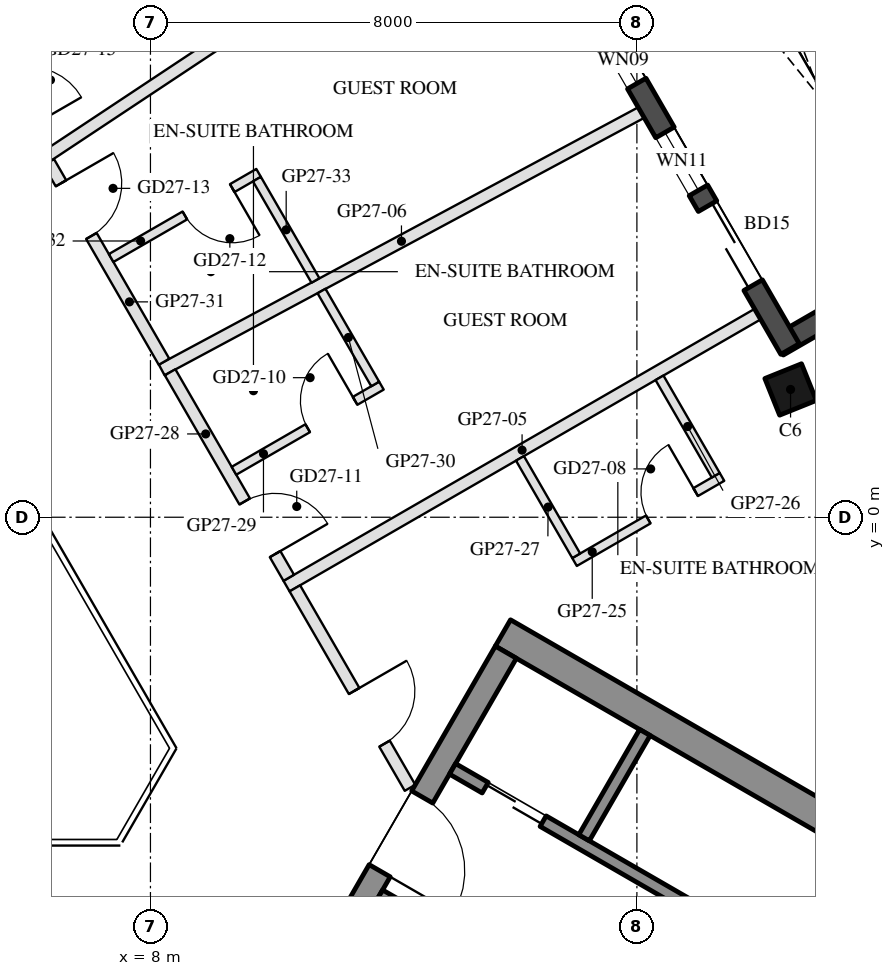
"""IFC4 building model, lengths in metres.
Left out: names, types, materials, properties, quantities, classifications, styles, units other than length and angle.
Written with IfcOpenShell. Run it as: python <this file> out.ifc"""

import sys

from ifc_helpers import new_model, si_unit, direction, frame, frame_2d, origin, origin_2d, place, context, subcontext, project, spatial, rectangle, hollow_rectangle, extrude, boolean, halfspace, element, fill, save


model = new_model("IFC4")
c1 = context("Model", 3, precision=1e-05, world=origin(), true_north=direction((0.0, 1.0)))
c2 = subcontext(c1, "Body", "Model", "MODEL_VIEW")
j1 = project(units=[si_unit("LENGTHUNIT", "METRE"), si_unit("PLANEANGLEUNIT", "RADIAN")], contexts=[c1])
p1 = place(None, origin())
s1 = spatial("IfcSite", under=j1, at=p1, CompositionType="ELEMENT")
p2 = place(p1, origin())
s2 = spatial("IfcBuilding", under=s1, at=p2, CompositionType="ELEMENT")
p3 = place(p2, frame((0.0, 0.0, 276.3)))
s3 = spatial("IfcBuildingStorey", under=s2, at=p3, CompositionType="ELEMENT", Elevation=276.3)
p4 = place(p3, frame((18.527, 2.102, 0.0), z_axis=(-0.16132511193, -0.02291623866, 0.98663521844), x_axis=(0.495162384909, -0.866667980787, 0.060834395287)))
e1 = element("IfcColumn", 1, at=p4, inside=s3, PredefinedType="COLUMN", context=c2, shape_type="SweptSolid", body=[
    boolean("DIFFERENCE", boolean("DIFFERENCE", extrude(hollow_rectangle(XDim=0.65, YDim=0.65, WallThickness=0.03, at=origin_2d()), origin(), (0.0, 0.0, 1.0), 3.75), halfspace(frame((0.0, 0.0, 0.04), z_axis=(0.0, 0.0, 1.0), x_axis=(1.0, 0.0, 0.0)), True)), halfspace(frame((0.0, 0.0, 3.71), z_axis=(0.0, 0.0, 1.0), x_axis=(1.0, 0.0, 0.0)), False)),
])
p5 = place(p3, frame((19.377, 3.429, 0.0), z_axis=(0.0, 0.0, 1.0), x_axis=(-0.866092288191, -0.499884134912, 0.0)))
e2 = element("IfcWall", 2, at=p5, inside=s3, PredefinedType="SOLIDWALL", context=c2, shape_type="SweptSolid", body=[
    extrude(rectangle(XDim=1.22, YDim=0.35, at=frame_2d((0.61, 0.0))), origin(), (0.0, 0.0, 1.0), 3.55),
])
p6 = place(p3, frame((18.519, 2.766, 0.0), z_axis=(0.0, 0.0, 1.0), x_axis=(-0.499995993298, 0.866027717042, 0.0)))
e3 = element("IfcWall", 3, at=p6, inside=s3, PredefinedType="SOLIDWALL", context=c2, shape_type="SweptSolid", body=[
    extrude(rectangle(XDim=6.284, YDim=0.35, at=frame_2d((3.142, 0.0))), origin(), (0.0, 0.0, 1.0), 3.55),
])
p7 = place(p6, frame((1.213, 0.0, 0.0)))
e4 = element("IfcOpeningElement", 4, at=p7, cuts=e3, PredefinedType="OPENING", context=c2, shape_type="SweptSolid", body=[
    extrude(rectangle(XDim=1.5, YDim=2.4, at=frame_2d((0.75, 1.2))), frame((0.0, 0.185, 0.0), z_axis=(0.0, -1.0, 0.0), x_axis=(1.0, 0.0, 0.0)), (0.0, 0.0, 1.0), 0.37),
])
p8 = place(p6, frame((3.013, 0.0, 0.3)))
e5 = element("IfcOpeningElement", 5, at=p8, cuts=e3, PredefinedType="OPENING", context=c2, shape_type="SweptSolid", body=[
    extrude(rectangle(XDim=1.1, YDim=2.65, at=frame_2d((0.55, 1.325))), frame((0.0, 0.185, 0.0), z_axis=(0.0, -1.0, 0.0), x_axis=(1.0, 0.0, 0.0)), (0.0, 0.0, 1.0), 0.37),
])
p9 = place(p6, frame((5.042, 0.0, 0.3)))
e6 = element("IfcOpeningElement", 6, at=p9, cuts=e3, PredefinedType="OPENING", context=c2, shape_type="SweptSolid", body=[
    extrude(rectangle(XDim=0.9, YDim=2.65, at=frame_2d((0.45, 1.325))), frame((0.0, 0.185, 0.0), z_axis=(0.0, -1.0, 0.0), x_axis=(1.0, 0.0, 0.0)), (0.0, 0.0, 1.0), 0.37),
])
p10 = place(p3, frame((13.797, -1.903, 0.0), z_axis=(0.0, 0.0, 1.0), x_axis=(0.866022106474, -0.500005711065, 0.0)))
e7 = element("IfcWall", 7, at=p10, inside=s3, PredefinedType="SHEAR", context=c2, shape_type="SweptSolid", body=[
    extrude(rectangle(XDim=13.031, YDim=0.5, at=frame_2d((6.516, 0.0))), origin(), (0.0, 0.0, 1.0), 3.5),
])
p11 = place(p3, frame((8.845, -10.88, 0.0), z_axis=(0.0, 0.0, 1.0), x_axis=(0.500004234368, 0.866022959057, 0.0)))
e8 = element("IfcWall", 8, at=p11, inside=s3, PredefinedType="SHEAR", context=c2, shape_type="SweptSolid", body=[
    extrude(rectangle(XDim=10.0, YDim=0.4, at=frame_2d((5.0, 0.0))), origin(), (0.0, 0.0, 1.0), 3.5),
])
p12 = place(p11, frame((3.55, 0.0, 0.0)))
e9 = element("IfcOpeningElement", 9, at=p12, cuts=e8, PredefinedType="OPENING", context=c2, shape_type="SweptSolid", body=[
    extrude(rectangle(XDim=1.1, YDim=2.1, at=frame_2d((0.55, 1.05))), frame((0.0, 0.21, 0.0), z_axis=(0.0, -1.0, 0.0), x_axis=(1.0, 0.0, 0.0)), (0.0, 0.0, 1.0), 0.42),
])
p13 = place(p11, frame((5.85, 0.0, 0.0)))
e10 = element("IfcOpeningElement", 10, at=p13, cuts=e8, PredefinedType="OPENING", context=c2, shape_type="SweptSolid", body=[
    extrude(rectangle(XDim=1.4, YDim=2.1, at=frame_2d((0.7, 1.05))), frame((0.0, 0.21, 0.0), z_axis=(0.0, -1.0, 0.0), x_axis=(1.0, 0.0, 0.0)), (0.0, 0.0, 1.0), 0.42),
])
p14 = place(p3, frame((11.768, -6.217, 0.0), z_axis=(0.0, 0.0, 1.0), x_axis=(0.866050077142, -0.499957262057, 0.0)))
e11 = element("IfcWall", 11, at=p14, inside=s3, PredefinedType="SHEAR", context=c2, shape_type="SweptSolid", body=[
    extrude(rectangle(XDim=2.4, YDim=0.2, at=frame_2d((1.2, 0.0))), origin(), (0.0, 0.0, 1.0), 3.5),
])
p15 = place(p3, frame((12.968, -4.138, 0.0), z_axis=(0.0, 0.0, 1.0), x_axis=(0.866028328073, -0.49999493495, 0.0)))
e12 = element("IfcWall", 12, at=p15, inside=s3, PredefinedType="SHEAR", context=c2, shape_type="SweptSolid", body=[
    extrude(rectangle(XDim=10.16, YDim=0.2, at=frame_2d((5.08, 0.0))), origin(), (0.0, 0.0, 1.0), 3.5),
])
p16 = place(p15, frame((0.62, 0.0, 0.0)))
e13 = element("IfcOpeningElement", 13, at=p16, cuts=e12, PredefinedType="OPENING", context=c2, shape_type="SweptSolid", body=[
    extrude(rectangle(XDim=1.1, YDim=2.1, at=frame_2d((0.55, 1.05))), frame((0.0, 0.11, 0.0), z_axis=(0.0, -1.0, 0.0), x_axis=(1.0, 0.0, 0.0)), (0.0, 0.0, 1.0), 0.22),
])
p17 = place(p15, frame((5.8, 0.0, 0.0)))
e14 = element("IfcOpeningElement", 14, at=p17, cuts=e12, PredefinedType="OPENING", context=c2, shape_type="SweptSolid", body=[
    extrude(rectangle(XDim=0.9, YDim=2.1, at=frame_2d((0.45, 1.05))), frame((0.0, 0.11, 0.0), z_axis=(0.0, -1.0, 0.0), x_axis=(1.0, 0.0, 0.0)), (0.0, 0.0, 1.0), 0.22),
])
p18 = place(p3, frame((15.131, -5.272, 0.0), z_axis=(0.0, 0.0, 1.0), x_axis=(0.499972520799, 0.866041268327, 0.0)))
e15 = element("IfcWall", 15, at=p18, inside=s3, PredefinedType="SHEAR", context=c2, shape_type="SweptSolid", body=[
    extrude(rectangle(XDim=2.0, YDim=0.2, at=frame_2d((1.0, 0.0))), origin(), (0.0, 0.0, 1.0), 3.5),
])
p19 = place(p3, frame((17.985, 3.34, 0.0), z_axis=(0.0, 0.0, 1.0), x_axis=(-0.866026066645, -0.499998851889, 0.0)))
e16 = element("IfcWall", 16, at=p19, inside=s3, PredefinedType="PARTITIONING", context=c2, shape_type="SweptSolid", body=[
    extrude(rectangle(XDim=8.946, YDim=0.2, at=frame_2d((4.473, 0.0))), origin(), (0.0, 0.0, 1.0), 3.1),
])
p20 = place(p3, frame((16.071, 6.655, 0.0), z_axis=(0.0, 0.0, 1.0), x_axis=(-0.881152506706, -0.472832168877, 0.0)))
e17 = element("IfcWall", 17, at=p20, inside=s3, PredefinedType="PARTITIONING", context=c2, shape_type="SweptSolid", body=[
    extrude(rectangle(XDim=8.95, YDim=0.2, at=frame_2d((4.475, 0.0))), origin(), (0.0, 0.0, 1.0), 3.1),
])
p21 = place(p3, frame((14.415, 11.325, 0.0), z_axis=(0.0, 0.0, 1.0), x_axis=(-0.833315981996, -0.552796955626, 0.0)))
e18 = element("IfcWall", 18, at=p21, inside=s3, PredefinedType="PARTITIONING", context=c2, shape_type="SweptSolid", body=[
    extrude(rectangle(XDim=9.865, YDim=0.2, at=frame_2d((4.933, 0.0))), origin(), (0.0, 0.0, 1.0), 3.1),
])
p22 = place(p3, frame((10.375, -1.169, 0.0), z_axis=(0.0, 0.0, 1.0), x_axis=(0.500055316652, -0.865993464345, 0.0)))
e19 = element("IfcWall", 19, at=p22, inside=s3, PredefinedType="PARTITIONING", context=c2, shape_type="SweptSolid", body=[
    extrude(rectangle(XDim=3.788, YDim=0.2, at=frame_2d((1.894, 0.0))), origin(), (0.0, 0.0, 1.0), 3.05),
])
p23 = place(p22, frame((1.95, 0.0, 0.0)))
e20 = element("IfcOpeningElement", 20, at=p23, cuts=e19, PredefinedType="OPENING", context=c2, shape_type="SweptSolid", body=[
    extrude(rectangle(XDim=1.0, YDim=2.1, at=frame_2d((0.5, 1.05))), frame((0.0, 0.11, 0.0), z_axis=(0.0, -1.0, 0.0), x_axis=(1.0, 0.0, 0.0)), (0.0, 0.0, 1.0), 0.22),
])
p24 = place(p3, frame((14.974, -0.737, 0.0), z_axis=(0.0, 0.0, 1.0), x_axis=(0.866018616679, 0.500011755427, 0.0)))
e21 = element("IfcWall", 21, at=p24, inside=s3, PredefinedType="PARTITIONING", context=c2, shape_type="SweptSolid", body=[
    extrude(rectangle(XDim=2.8, YDim=0.15, at=frame_2d((1.4, 0.0))), origin(), (0.0, 0.0, 1.0), 3.55),
])
p25 = place(p24, frame((1.4, 0.0, 0.0)))
e22 = element("IfcOpeningElement", 22, at=p25, cuts=e21, PredefinedType="OPENING", context=c2, shape_type="SweptSolid", body=[
    extrude(rectangle(XDim=0.9, YDim=2.1, at=frame_2d((0.45, 1.05))), frame((0.0, 0.085, 0.0), z_axis=(0.0, -1.0, 0.0), x_axis=(1.0, 0.0, 0.0)), (0.0, 0.0, 1.0), 0.17),
])
p26 = place(p3, frame((17.297, 0.691, 0.0), z_axis=(0.0, 0.0, 1.0), x_axis=(-0.499985172903, 0.866033964044, 0.0)))
e23 = element("IfcWall", 23, at=p26, inside=s3, PredefinedType="PARTITIONING", context=c2, shape_type="SweptSolid", body=[
    extrude(rectangle(XDim=1.85, YDim=0.15, at=frame_2d((0.925, 0.0))), origin(), (0.0, 0.0, 1.0), 3.05),
])
p27 = place(p3, frame((15.002, -0.634, 0.0), z_axis=(0.0, 0.0, 1.0), x_axis=(-0.500042316284, 0.866000971088, 0.0)))
e24 = element("IfcWall", 24, at=p27, inside=s3, PredefinedType="PARTITIONING", context=c2, shape_type="SweptSolid", body=[
    extrude(rectangle(XDim=1.85, YDim=0.15, at=frame_2d((0.925, 0.0))), origin(), (0.0, 0.0, 1.0), 3.05),
])
p28 = place(p3, frame((8.323, 2.384, 0.0), z_axis=(0.0, 0.0, 1.0), x_axis=(0.500027468252, -0.866009544401, 0.0)))
e25 = element("IfcWall", 25, at=p28, inside=s3, PredefinedType="PARTITIONING", context=c2, shape_type="SweptSolid", body=[
    extrude(rectangle(XDim=3.903, YDim=0.2, at=frame_2d((1.952, 0.0))), origin(), (0.0, 0.0, 1.0), 3.05),
])
p29 = place(p28, frame((2.453, 0.0, 0.0)))
e26 = element("IfcOpeningElement", 26, at=p29, cuts=e25, PredefinedType="OPENING", context=c2, shape_type="SweptSolid", body=[
    extrude(rectangle(XDim=1.0, YDim=2.1, at=frame_2d((0.5, 1.05))), frame((0.0, 0.11, 0.0), z_axis=(0.0, -1.0, 0.0), x_axis=(1.0, 0.0, 0.0)), (0.0, 0.0, 1.0), 0.22),
])
p30 = place(p3, frame((9.374, 0.764, 0.0), z_axis=(0.0, 0.0, 1.0), x_axis=(0.865996816683, 0.500049511043, 0.0)))
e27 = element("IfcWall", 27, at=p30, inside=s3, PredefinedType="PARTITIONING", context=c2, shape_type="SweptSolid", body=[
    extrude(rectangle(XDim=2.8, YDim=0.15, at=frame_2d((1.4, 0.0))), origin(), (0.0, 0.0, 1.0), 3.55),
])
p31 = place(p30, frame((1.4, 0.0, 0.0)))
e28 = element("IfcOpeningElement", 28, at=p31, cuts=e27, PredefinedType="OPENING", context=c2, shape_type="SweptSolid", body=[
    extrude(rectangle(XDim=0.9, YDim=2.1, at=frame_2d((0.45, 1.05))), frame((0.0, 0.085, 0.0), z_axis=(0.0, -1.0, 0.0), x_axis=(1.0, 0.0, 0.0)), (0.0, 0.0, 1.0), 0.17),
])
p32 = place(p3, frame((11.696, 2.192, 0.0), z_axis=(0.0, 0.0, 1.0), x_axis=(-0.50006561292, 0.865987518834, 0.0)))
e29 = element("IfcWall", 29, at=p32, inside=s3, PredefinedType="PARTITIONING", context=c2, shape_type="SweptSolid", body=[
    extrude(rectangle(XDim=1.765, YDim=0.15, at=frame_2d((0.883, 0.0))), origin(), (0.0, 0.0, 1.0), 3.05),
])
p33 = place(p3, frame((6.328, 5.84, 0.0), z_axis=(0.0, 0.0, 1.0), x_axis=(0.49997708301, -0.86603863451, 0.0)))
e30 = element("IfcWall", 30, at=p33, inside=s3, PredefinedType="PARTITIONING", context=c2, shape_type="SweptSolid", body=[
    extrude(rectangle(XDim=3.79, YDim=0.2, at=frame_2d((1.895, 0.0))), origin(), (0.0, 0.0, 1.0), 3.05),
])
p34 = place(p33, frame((0.402, 0.0, 0.0)))
e31 = element("IfcOpeningElement", 31, at=p34, cuts=e30, PredefinedType="OPENING", context=c2, shape_type="SweptSolid", body=[
    extrude(rectangle(XDim=1.0, YDim=2.1, at=frame_2d((0.5, 1.05))), frame((0.0, 0.11, 0.0), z_axis=(0.0, -1.0, 0.0), x_axis=(1.0, 0.0, 0.0)), (0.0, 0.0, 1.0), 0.22),
])
p35 = place(p3, frame((9.778, 5.663, 0.0), z_axis=(0.0, 0.0, 1.0), x_axis=(-0.866034573852, -0.49998411664, 0.0)))
e32 = element("IfcWall", 32, at=p35, inside=s3, PredefinedType="PARTITIONING", context=c2, shape_type="SweptSolid", body=[
    extrude(rectangle(XDim=2.8, YDim=0.15, at=frame_2d((1.4, 0.0))), origin(), (0.0, 0.0, 1.0), 3.05),
])
p36 = place(p35, frame((0.5, 0.0, 0.0)))
e33 = element("IfcOpeningElement", 33, at=p36, cuts=e32, PredefinedType="OPENING", context=c2, shape_type="SweptSolid", body=[
    extrude(rectangle(XDim=0.9, YDim=2.1, at=frame_2d((0.45, 1.05))), frame((0.0, 0.085, 0.0), z_axis=(0.0, -1.0, 0.0), x_axis=(1.0, 0.0, 0.0)), (0.0, 0.0, 1.0), 0.17),
])
p37 = place(p3, frame((10.713, 3.894, 0.0), z_axis=(0.0, 0.0, 1.0), x_axis=(-0.499931040243, 0.866065214058, 0.0)))
e34 = element("IfcWall", 34, at=p37, inside=s3, PredefinedType="PARTITIONING", context=c2, shape_type="SweptSolid", body=[
    extrude(rectangle(XDim=1.925, YDim=0.15, at=frame_2d((0.962, 0.0))), origin(), (0.0, 0.0, 1.0), 3.05),
])
p38 = place(p7, frame((1.5, 0.0, 0.0), z_axis=(0.0, 0.0, 1.0), x_axis=(-1.0, 0.0, 0.0)))
e35 = element("IfcDoor", 35, at=p38, inside=s3, OperationType="SLIDING_TO_LEFT", PredefinedType="DOOR", context=c2, shape_type="SweptSolid", body=[
    extrude(rectangle(XDim=1.5, YDim=2.4, at=frame_2d((0.75, 1.2))), frame((0.0, 0.025, 0.0), z_axis=(0.0, -1.0, 0.0), x_axis=(1.0, 0.0, 0.0)), (0.0, 0.0, 1.0), 0.05),
])
fill(e4, e35)
p39 = place(p8, origin())
e36 = element("IfcWindow", 36, at=p39, inside=s3, PartitioningType="SINGLE_PANEL", PredefinedType="WINDOW", context=c2, shape_type="SweptSolid", body=[
    extrude(rectangle(XDim=1.1, YDim=2.65, at=frame_2d((0.55, 1.325))), frame((0.0, 0.03, 0.0), z_axis=(0.0, -1.0, 0.0), x_axis=(1.0, 0.0, 0.0)), (0.0, 0.0, 1.0), 0.06),
])
fill(e5, e36)
p40 = place(p9, origin())
e37 = element("IfcWindow", 37, at=p40, inside=s3, PartitioningType="SINGLE_PANEL", PredefinedType="WINDOW", context=c2, shape_type="SweptSolid", body=[
    extrude(rectangle(XDim=0.9, YDim=2.65, at=frame_2d((0.45, 1.325))), frame((0.0, 0.03, 0.0), z_axis=(0.0, -1.0, 0.0), x_axis=(1.0, 0.0, 0.0)), (0.0, 0.0, 1.0), 0.06),
])
fill(e6, e37)
p41 = place(p16, origin())
e38 = element("IfcDoor", 38, at=p41, inside=s3, OperationType="DOUBLE_DOOR_SLIDING", PredefinedType="DOOR", context=c2, shape_type="SweptSolid", body=[
    extrude(rectangle(XDim=1.1, YDim=2.1, at=frame_2d((0.55, 1.05))), frame((0.0, 0.025, 0.0), z_axis=(0.0, -1.0, 0.0), x_axis=(1.0, 0.0, 0.0)), (0.0, 0.0, 1.0), 0.05),
])
fill(e13, e38)
p42 = place(p13, frame((1.4, 0.0, 0.0), z_axis=(0.0, 0.0, 1.0), x_axis=(-1.0, 0.0, 0.0)))
e39 = element("IfcDoor", 39, at=p42, inside=s3, OperationType="DOUBLE_DOOR_SINGLE_SWING", PredefinedType="DOOR", context=c2, shape_type="SweptSolid", body=[
    extrude(rectangle(XDim=1.4, YDim=2.1, at=frame_2d((0.7, 1.05))), frame((0.0, 0.025, 0.0), z_axis=(0.0, -1.0, 0.0), x_axis=(1.0, 0.0, 0.0)), (0.0, 0.0, 1.0), 0.05),
])
fill(e10, e39)
p43 = place(p25, origin())
e40 = element("IfcDoor", 40, at=p43, inside=s3, OperationType="SINGLE_SWING_RIGHT", PredefinedType="DOOR", context=c2, shape_type="SweptSolid", body=[
    extrude(rectangle(XDim=0.9, YDim=2.1, at=frame_2d((0.45, 1.05))), frame((0.0, 0.025, 0.0), z_axis=(0.0, -1.0, 0.0), x_axis=(1.0, 0.0, 0.0)), (0.0, 0.0, 1.0), 0.05),
])
fill(e22, e40)
p44 = place(p23, origin())
e41 = element("IfcDoor", 41, at=p44, inside=s3, OperationType="SINGLE_SWING_LEFT", PredefinedType="DOOR", context=c2, shape_type="SweptSolid", body=[
    extrude(rectangle(XDim=1.0, YDim=2.1, at=frame_2d((0.5, 1.05))), frame((0.0, 0.025, 0.0), z_axis=(0.0, -1.0, 0.0), x_axis=(1.0, 0.0, 0.0)), (0.0, 0.0, 1.0), 0.05),
])
fill(e20, e41)
p45 = place(p31, origin())
e42 = element("IfcDoor", 42, at=p45, inside=s3, OperationType="SINGLE_SWING_RIGHT", PredefinedType="DOOR", context=c2, shape_type="SweptSolid", body=[
    extrude(rectangle(XDim=0.9, YDim=2.1, at=frame_2d((0.45, 1.05))), frame((0.0, 0.025, 0.0), z_axis=(0.0, -1.0, 0.0), x_axis=(1.0, 0.0, 0.0)), (0.0, 0.0, 1.0), 0.05),
])
fill(e28, e42)
p46 = place(p29, origin())
e43 = element("IfcDoor", 43, at=p46, inside=s3, OperationType="SINGLE_SWING_RIGHT", PredefinedType="DOOR", context=c2, shape_type="SweptSolid", body=[
    extrude(rectangle(XDim=1.0, YDim=2.1, at=frame_2d((0.5, 1.05))), frame((0.0, 0.025, 0.0), z_axis=(0.0, -1.0, 0.0), x_axis=(1.0, 0.0, 0.0)), (0.0, 0.0, 1.0), 0.05),
])
fill(e26, e43)
p47 = place(p36, origin())
e44 = element("IfcDoor", 44, at=p47, inside=s3, OperationType="SINGLE_SWING_LEFT", PredefinedType="DOOR", context=c2, shape_type="SweptSolid", body=[
    extrude(rectangle(XDim=0.9, YDim=2.1, at=frame_2d((0.45, 1.05))), frame((0.0, 0.025, 0.0), z_axis=(0.0, -1.0, 0.0), x_axis=(1.0, 0.0, 0.0)), (0.0, 0.0, 1.0), 0.05),
])
fill(e33, e44)
p48 = place(p34, origin())
e45 = element("IfcDoor", 45, at=p48, inside=s3, OperationType="SINGLE_SWING_LEFT", PredefinedType="DOOR", context=c2, shape_type="SweptSolid", body=[
    extrude(rectangle(XDim=1.0, YDim=2.1, at=frame_2d((0.5, 1.05))), frame((0.0, 0.025, 0.0), z_axis=(0.0, -1.0, 0.0), x_axis=(1.0, 0.0, 0.0)), (0.0, 0.0, 1.0), 0.05),
])
fill(e31, e45)
save(model, sys.argv[1])
